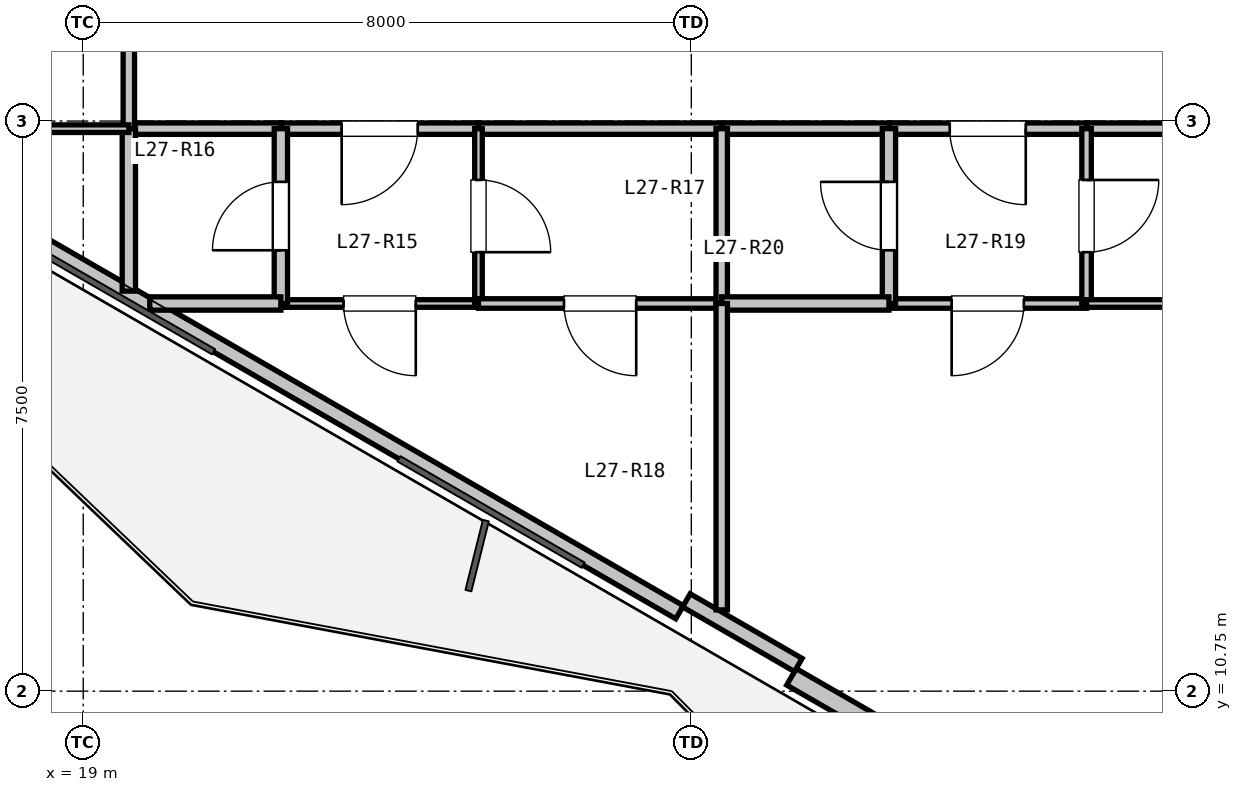
"""IFC4 building model, lengths in metres.
Left out: names, types, materials, properties, quantities, classifications, styles, units other than length and angle.
Written with IfcOpenShell. Run it as: python <this file> out.ifc"""

import sys

from ifc_helpers import new_model, si_unit, direction, frame, frame_2d, origin, place, context, subcontext, project, spatial, rectangle, extrude, element, fill, save


model = new_model("IFC4")
c1 = context("Model", 3, precision=1e-05, world=origin(), true_north=direction((0.0, 1.0)))
c2 = subcontext(c1, "Body", "Model", "MODEL_VIEW")
j1 = project(units=[si_unit("LENGTHUNIT", "METRE"), si_unit("PLANEANGLEUNIT", "RADIAN")], contexts=[c1])
p1 = place(None, origin())
s1 = spatial("IfcSite", under=j1, at=p1, CompositionType="ELEMENT")
p2 = place(p1, origin())
s2 = spatial("IfcBuilding", under=s1, at=p2, CompositionType="ELEMENT")
p3 = place(p2, frame((0.0, 0.0, 99.9)))
s3 = spatial("IfcBuildingStorey", under=s2, at=p3, CompositionType="ELEMENT", Elevation=99.9)
p4 = place(p3, frame((38.649, 4.973, 0.0), z_axis=(0.0, 0.0, 1.0), x_axis=(-0.866023023012, 0.500004123596, 0.0)))
e1 = element("IfcWall", 1, at=p4, inside=s3, PredefinedType="SOLIDWALL", context=c2, shape_type="SweptSolid", body=[
    extrude(rectangle(XDim=11.93, YDim=0.25, at=frame_2d((5.965, 0.0))), origin(), (0.0, 0.0, 1.0), 2.67),
])
p5 = place(p4, frame((7.616, 0.0, 0.0)))
e2 = element("IfcOpeningElement", 2, at=p5, cuts=e1, PredefinedType="OPENING", context=c2, shape_type="SweptSolid", body=[
    extrude(rectangle(XDim=1.1, YDim=2.1, at=frame_2d((0.55, 1.05))), frame((0.0, 0.135, 0.0), z_axis=(0.0, -1.0, 0.0), x_axis=(1.0, 0.0, 0.0)), (0.0, 0.0, 1.0), 0.27),
])
p6 = place(p3, frame((26.845, 11.788, 0.0), z_axis=(0.0, 0.0, 1.0), x_axis=(-0.866027010039, 0.499997217876, 0.0)))
e3 = element("IfcWall", 3, at=p6, inside=s3, PredefinedType="PARAPET", context=c2, shape_type="SweptSolid", body=[
    extrude(rectangle(XDim=11.229, YDim=0.2, at=frame_2d((5.615, 0.0))), origin(), (0.0, 0.0, 1.0), 0.2),
])
p7 = place(p3, frame((28.407, 11.094, 0.0), z_axis=(0.0, 0.0, 1.0), x_axis=(-0.86605165483, 0.499954529098, 0.0)))
e4 = element("IfcWall", 4, at=p7, inside=s3, PredefinedType="PARAPET", context=c2, shape_type="SweptSolid", body=[
    extrude(rectangle(XDim=1.7, YDim=0.2, at=frame_2d((0.85, 0.0))), origin(), (0.0, 0.0, 1.0), 2.67),
])
p8 = place(p3, frame((35.8, 18.15, 0.0), z_axis=(0.0, 0.0, 1.0), x_axis=(-1.0, 0.0, 0.0)))
e5 = element("IfcWall", 5, at=p8, inside=s3, PredefinedType="PARTITIONING", context=c2, shape_type="SweptSolid", body=[
    extrude(rectangle(XDim=3.6, YDim=0.15, at=frame_2d((1.8, 0.0))), origin(), (0.0, 0.0, 1.0), 3.05),
])
p9 = place(p3, frame((32.2, 18.15, 0.0), z_axis=(0.0, 0.0, 1.0), x_axis=(-1.0, 0.0, 0.0)))
e6 = element("IfcWall", 6, at=p9, inside=s3, PredefinedType="PARTITIONING", context=c2, shape_type="SweptSolid", body=[
    extrude(rectangle(XDim=2.6, YDim=0.15, at=frame_2d((1.3, 0.0))), origin(), (0.0, 0.0, 1.0), 3.05),
])
p10 = place(p9, frame((0.8, 0.0, 0.0)))
e7 = element("IfcOpeningElement", 7, at=p10, cuts=e6, PredefinedType="OPENING", context=c2, shape_type="SweptSolid", body=[
    extrude(rectangle(XDim=1.0, YDim=2.15, at=frame_2d((0.5, 1.075))), frame((0.0, 0.085, 0.0), z_axis=(0.0, -1.0, 0.0), x_axis=(1.0, 0.0, 0.0)), (0.0, 0.0, 1.0), 0.17),
])
p11 = place(p3, frame((29.6, 18.15, 0.0), z_axis=(0.0, 0.0, 1.0), x_axis=(-1.0, 0.0, 0.0)))
e8 = element("IfcWall", 8, at=p11, inside=s3, PredefinedType="PARTITIONING", context=c2, shape_type="SweptSolid", body=[
    extrude(rectangle(XDim=2.2, YDim=0.15, at=frame_2d((1.1, 0.0))), origin(), (0.0, 0.0, 1.0), 3.05),
])
p12 = place(p3, frame((27.4, 18.15, 0.0), z_axis=(0.0, 0.0, 1.0), x_axis=(-1.0, 0.0, 0.0)))
e9 = element("IfcWall", 9, at=p12, inside=s3, PredefinedType="PARTITIONING", context=c2, shape_type="SweptSolid", body=[
    extrude(rectangle(XDim=3.2, YDim=0.15, at=frame_2d((1.6, 0.0))), origin(), (0.0, 0.0, 1.0), 2.423),
])
p13 = place(p3, frame((24.2, 18.15, 0.0), z_axis=(0.0, 0.0, 1.0), x_axis=(-1.0, 0.0, 0.0)))
e10 = element("IfcWall", 10, at=p13, inside=s3, PredefinedType="PARTITIONING", context=c2, shape_type="SweptSolid", body=[
    extrude(rectangle(XDim=2.6, YDim=0.15, at=frame_2d((1.3, 0.0))), origin(), (0.0, 0.0, 1.0), 2.423),
])
p14 = place(p13, frame((0.8, 0.0, 0.0)))
e11 = element("IfcOpeningElement", 11, at=p14, cuts=e10, PredefinedType="OPENING", context=c2, shape_type="SweptSolid", body=[
    extrude(rectangle(XDim=1.0, YDim=2.15, at=frame_2d((0.5, 1.075))), frame((0.0, 0.085, 0.0), z_axis=(0.0, -1.0, 0.0), x_axis=(1.0, 0.0, 0.0)), (0.0, 0.0, 1.0), 0.17),
])
p15 = place(p3, frame((21.6, 18.15, 0.0), z_axis=(0.0, 0.0, 1.0), x_axis=(-1.0, 0.0, 0.0)))
e12 = element("IfcWall", 12, at=p15, inside=s3, PredefinedType="PARTITIONING", context=c2, shape_type="SweptSolid", body=[
    extrude(rectangle(XDim=2.0, YDim=0.15, at=frame_2d((1.0, 0.0))), origin(), (0.0, 0.0, 1.0), 3.05),
])
p16 = place(p3, frame((19.6, 18.15, 0.0), z_axis=(0.0, 0.0, 1.0), x_axis=(0.0, 1.0, 0.0)))
e13 = element("IfcWall", 13, at=p16, inside=s3, PredefinedType="PARTITIONING", context=c2, shape_type="SweptSolid", body=[
    extrude(rectangle(XDim=3.65, YDim=0.15, at=frame_2d((1.825, 0.0))), origin(), (0.0, 0.0, 1.0), 2.423),
])
p17 = place(p16, frame((1.325, 0.0, 0.0)))
e14 = element("IfcOpeningElement", 14, at=p17, cuts=e13, PredefinedType="OPENING", context=c2, shape_type="SweptSolid", body=[
    extrude(rectangle(XDim=1.0, YDim=2.15, at=frame_2d((0.5, 1.075))), frame((0.0, 0.085, 0.0), z_axis=(0.0, -1.0, 0.0), x_axis=(1.0, 0.0, 0.0)), (0.0, 0.0, 1.0), 0.17),
])
p18 = place(p3, frame((24.2, 15.85, 0.0), z_axis=(0.0, 0.0, 1.0), x_axis=(-1.0, 0.0, 0.0)))
e15 = element("IfcWall", 15, at=p18, inside=s3, PredefinedType="PARTITIONING", context=c2, shape_type="SweptSolid", body=[
    extrude(rectangle(XDim=2.6, YDim=0.1, at=frame_2d((1.3, 0.0))), origin(), (0.0, 0.0, 1.0), 3.05),
])
p19 = place(p18, frame((0.825, 0.0, 0.0)))
e16 = element("IfcOpeningElement", 16, at=p19, cuts=e15, PredefinedType="OPENING", context=c2, shape_type="SweptSolid", body=[
    extrude(rectangle(XDim=0.95, YDim=2.1, at=frame_2d((0.475, 1.05))), frame((0.0, 0.06, 0.0), z_axis=(0.0, -1.0, 0.0), x_axis=(1.0, 0.0, 0.0)), (0.0, 0.0, 1.0), 0.12),
])
p20 = place(p3, frame((21.6, 15.85, 0.0), z_axis=(0.0, 0.0, 1.0), x_axis=(0.0, 1.0, 0.0)))
e17 = element("IfcWall", 17, at=p20, inside=s3, PredefinedType="PLUMBINGWALL", context=c2, shape_type="SweptSolid", body=[
    extrude(rectangle(XDim=2.3, YDim=0.175, at=frame_2d((1.15, 0.0))), origin(), (0.0, 0.0, 1.0), 3.05),
])
p21 = place(p20, frame((0.7, 0.0, 0.0)))
e18 = element("IfcOpeningElement", 18, at=p21, cuts=e17, PredefinedType="OPENING", context=c2, shape_type="SweptSolid", body=[
    extrude(rectangle(XDim=0.9, YDim=2.1, at=frame_2d((0.45, 1.05))), frame((0.0, 0.097, 0.0), z_axis=(0.0, -1.0, 0.0), x_axis=(1.0, 0.0, 0.0)), (0.0, 0.0, 1.0), 0.195),
])
p22 = place(p3, frame((24.2, 18.15, 0.0), z_axis=(0.0, 0.0, 1.0), x_axis=(0.0, -1.0, 0.0)))
e19 = element("IfcWall", 19, at=p22, inside=s3, PredefinedType="PARTITIONING", context=c2, shape_type="SweptSolid", body=[
    extrude(rectangle(XDim=2.3, YDim=0.1, at=frame_2d((1.15, 0.0))), origin(), (0.0, 0.0, 1.0), 2.423),
])
p23 = place(p22, frame((0.675, 0.0, 0.0)))
e20 = element("IfcOpeningElement", 20, at=p23, cuts=e19, PredefinedType="OPENING", context=c2, shape_type="SweptSolid", body=[
    extrude(rectangle(XDim=0.95, YDim=2.1, at=frame_2d((0.475, 1.05))), frame((0.0, 0.06, 0.0), z_axis=(0.0, -1.0, 0.0), x_axis=(1.0, 0.0, 0.0)), (0.0, 0.0, 1.0), 0.12),
])
p24 = place(p3, frame((32.2, 15.85, 0.0), z_axis=(0.0, 0.0, 1.0), x_axis=(-1.0, 0.0, 0.0)))
e21 = element("IfcWall", 21, at=p24, inside=s3, PredefinedType="PARTITIONING", context=c2, shape_type="SweptSolid", body=[
    extrude(rectangle(XDim=2.6, YDim=0.125, at=frame_2d((1.3, 0.0))), origin(), (0.0, 0.0, 1.0), 3.05),
])
p25 = place(p24, frame((0.825, 0.0, 0.0)))
e22 = element("IfcOpeningElement", 22, at=p25, cuts=e21, PredefinedType="OPENING", context=c2, shape_type="SweptSolid", body=[
    extrude(rectangle(XDim=0.95, YDim=2.1, at=frame_2d((0.475, 1.05))), frame((0.0, 0.073, 0.0), z_axis=(0.0, -1.0, 0.0), x_axis=(1.0, 0.0, 0.0)), (0.0, 0.0, 1.0), 0.145),
])
p26 = place(p3, frame((29.6, 15.85, 0.0), z_axis=(0.0, 0.0, 1.0), x_axis=(0.0, 1.0, 0.0)))
e23 = element("IfcWall", 23, at=p26, inside=s3, PredefinedType="PLUMBINGWALL", context=c2, shape_type="SweptSolid", body=[
    extrude(rectangle(XDim=2.3, YDim=0.175, at=frame_2d((1.15, 0.0))), origin(), (0.0, 0.0, 1.0), 3.05),
])
p27 = place(p26, frame((0.7, 0.0, 0.0)))
e24 = element("IfcOpeningElement", 24, at=p27, cuts=e23, PredefinedType="OPENING", context=c2, shape_type="SweptSolid", body=[
    extrude(rectangle(XDim=0.9, YDim=2.1, at=frame_2d((0.45, 1.05))), frame((0.0, 0.097, 0.0), z_axis=(0.0, -1.0, 0.0), x_axis=(1.0, 0.0, 0.0)), (0.0, 0.0, 1.0), 0.195),
])
p28 = place(p3, frame((32.2, 18.15, 0.0), z_axis=(0.0, 0.0, 1.0), x_axis=(0.0, -1.0, 0.0)))
e25 = element("IfcWall", 25, at=p28, inside=s3, PredefinedType="PARTITIONING", context=c2, shape_type="SweptSolid", body=[
    extrude(rectangle(XDim=2.3, YDim=0.125, at=frame_2d((1.15, 0.0))), origin(), (0.0, 0.0, 1.0), 3.05),
])
p29 = place(p28, frame((0.675, 0.0, 0.0)))
e26 = element("IfcOpeningElement", 26, at=p29, cuts=e25, PredefinedType="OPENING", context=c2, shape_type="SweptSolid", body=[
    extrude(rectangle(XDim=0.95, YDim=2.1, at=frame_2d((0.475, 1.05))), frame((0.0, 0.073, 0.0), z_axis=(0.0, -1.0, 0.0), x_axis=(1.0, 0.0, 0.0)), (0.0, 0.0, 1.0), 0.145),
])
p30 = place(p3, frame((21.6, 15.85, 0.0), z_axis=(0.0, 0.0, 1.0), x_axis=(-1.0, 0.0, 0.0)))
e27 = element("IfcWall", 27, at=p30, inside=s3, PredefinedType="PLUMBINGWALL", context=c2, shape_type="SweptSolid", body=[
    extrude(rectangle(XDim=1.725, YDim=0.175, at=frame_2d((0.862, 0.0))), origin(), (0.0, 0.0, 1.0), 2.365),
])
p31 = place(p3, frame((19.6, 16.013, 0.0), z_axis=(0.0, 0.0, 1.0), x_axis=(0.0, 1.0, 0.0)))
e28 = element("IfcWall", 28, at=p31, inside=s3, PredefinedType="PLUMBINGWALL", context=c2, shape_type="SweptSolid", body=[
    extrude(rectangle(XDim=2.137, YDim=0.175, at=frame_2d((1.068, 0.0))), origin(), (0.0, 0.0, 1.0), 2.365),
])
p32 = place(p3, frame((27.4, 15.85, 0.0), z_axis=(0.0, 0.0, 1.0), x_axis=(-1.0, 0.0, 0.0)))
e29 = element("IfcWall", 29, at=p32, inside=s3, PredefinedType="PARTITIONING", context=c2, shape_type="SweptSolid", body=[
    extrude(rectangle(XDim=3.2, YDim=0.125, at=frame_2d((1.6, 0.0))), origin(), (0.0, 0.0, 1.0), 2.423),
])
p33 = place(p32, frame((1.125, 0.0, 0.0)))
e30 = element("IfcOpeningElement", 30, at=p33, cuts=e29, PredefinedType="OPENING", context=c2, shape_type="SweptSolid", body=[
    extrude(rectangle(XDim=0.95, YDim=2.1, at=frame_2d((0.475, 1.05))), frame((0.0, 0.073, 0.0), z_axis=(0.0, -1.0, 0.0), x_axis=(1.0, 0.0, 0.0)), (0.0, 0.0, 1.0), 0.145),
])
p34 = place(p3, frame((27.4, 18.15, 0.0), z_axis=(0.0, 0.0, 1.0), x_axis=(0.0, -1.0, 0.0)))
e31 = element("IfcWall", 31, at=p34, inside=s3, PredefinedType="PARTITIONING", context=c2, shape_type="SweptSolid", body=[
    extrude(rectangle(XDim=2.3, YDim=0.15, at=frame_2d((1.15, 0.0))), origin(), (0.0, 0.0, 1.0), 3.05),
])
p35 = place(p3, frame((29.6, 15.85, 0.0), z_axis=(0.0, 0.0, 1.0), x_axis=(-1.0, 0.0, 0.0)))
e32 = element("IfcWall", 32, at=p35, inside=s3, PredefinedType="PLUMBINGWALL", context=c2, shape_type="SweptSolid", body=[
    extrude(rectangle(XDim=2.2, YDim=0.175, at=frame_2d((1.1, 0.0))), origin(), (0.0, 0.0, 1.0), 3.05),
])
p36 = place(p3, frame((35.8, 15.85, 0.0), z_axis=(0.0, 0.0, 1.0), x_axis=(-1.0, 0.0, 0.0)))
e33 = element("IfcWall", 33, at=p36, inside=s3, PredefinedType="PARTITIONING", context=c2, shape_type="SweptSolid", body=[
    extrude(rectangle(XDim=3.6, YDim=0.1, at=frame_2d((1.8, 0.0))), origin(), (0.0, 0.0, 1.0), 3.05),
])
p37 = place(p36, frame((1.325, 0.0, 0.0)))
e34 = element("IfcOpeningElement", 34, at=p37, cuts=e33, PredefinedType="OPENING", context=c2, shape_type="SweptSolid", body=[
    extrude(rectangle(XDim=0.95, YDim=2.1, at=frame_2d((0.475, 1.05))), frame((0.0, 0.06, 0.0), z_axis=(0.0, -1.0, 0.0), x_axis=(1.0, 0.0, 0.0)), (0.0, 0.0, 1.0), 0.12),
])
p38 = place(p3, frame((19.6, 18.15, 0.0), z_axis=(0.0, 0.0, 1.0), x_axis=(-1.0, 0.0, 0.0)))
e35 = element("IfcWall", 35, at=p38, inside=s3, PredefinedType="PARTITIONING", context=c2, shape_type="SweptSolid", body=[
    extrude(rectangle(XDim=2.6, YDim=0.1, at=frame_2d((1.3, 0.0))), origin(), (0.0, 0.0, 1.0), 2.365),
])
p39 = place(p3, frame((27.4, 15.85, 0.0), z_axis=(0.0, 0.0, 1.0), x_axis=(0.0, -1.0, 0.0)))
e36 = element("IfcWall", 36, at=p39, inside=s3, PredefinedType="PARTITIONING", context=c2, shape_type="SweptSolid", body=[
    extrude(rectangle(XDim=4.031, YDim=0.15, at=frame_2d((2.016, 0.0))), origin(), (0.0, 0.0, 1.0), 2.365),
])
p40 = place(p14, origin())
e37 = element("IfcDoor", 37, at=p40, inside=s3, OperationType="SINGLE_SWING_RIGHT", PredefinedType="DOOR", context=c2, shape_type="SweptSolid", body=[
    extrude(rectangle(XDim=1.0, YDim=2.15, at=frame_2d((0.5, 1.075))), frame((0.0, 0.025, 0.0), z_axis=(0.0, -1.0, 0.0), x_axis=(1.0, 0.0, 0.0)), (0.0, 0.0, 1.0), 0.05),
])
fill(e11, e37)
p41 = place(p10, origin())
e38 = element("IfcDoor", 38, at=p41, inside=s3, OperationType="SINGLE_SWING_LEFT", PredefinedType="DOOR", context=c2, shape_type="SweptSolid", body=[
    extrude(rectangle(XDim=1.0, YDim=2.15, at=frame_2d((0.5, 1.075))), frame((0.0, 0.025, 0.0), z_axis=(0.0, -1.0, 0.0), x_axis=(1.0, 0.0, 0.0)), (0.0, 0.0, 1.0), 0.05),
])
fill(e7, e38)
p42 = place(p21, origin())
e39 = element("IfcDoor", 39, at=p42, inside=s3, OperationType="SINGLE_SWING_LEFT", PredefinedType="DOOR", context=c2, shape_type="SweptSolid", body=[
    extrude(rectangle(XDim=0.9, YDim=2.1, at=frame_2d((0.45, 1.05))), frame((0.0, 0.025, 0.0), z_axis=(0.0, -1.0, 0.0), x_axis=(1.0, 0.0, 0.0)), (0.0, 0.0, 1.0), 0.05),
])
fill(e18, e39)
p43 = place(p23, origin())
e40 = element("IfcDoor", 40, at=p43, inside=s3, OperationType="SINGLE_SWING_RIGHT", PredefinedType="DOOR", context=c2, shape_type="SweptSolid", body=[
    extrude(rectangle(XDim=0.95, YDim=2.1, at=frame_2d((0.475, 1.05))), frame((0.0, 0.025, 0.0), z_axis=(0.0, -1.0, 0.0), x_axis=(1.0, 0.0, 0.0)), (0.0, 0.0, 1.0), 0.05),
])
fill(e20, e40)
p44 = place(p19, origin())
e41 = element("IfcDoor", 41, at=p44, inside=s3, OperationType="SINGLE_SWING_LEFT", PredefinedType="DOOR", context=c2, shape_type="SweptSolid", body=[
    extrude(rectangle(XDim=0.95, YDim=2.1, at=frame_2d((0.475, 1.05))), frame((0.0, 0.025, 0.0), z_axis=(0.0, -1.0, 0.0), x_axis=(1.0, 0.0, 0.0)), (0.0, 0.0, 1.0), 0.05),
])
fill(e16, e41)
p45 = place(p27, origin())
e42 = element("IfcDoor", 42, at=p45, inside=s3, OperationType="SINGLE_SWING_RIGHT", PredefinedType="DOOR", context=c2, shape_type="SweptSolid", body=[
    extrude(rectangle(XDim=0.9, YDim=2.1, at=frame_2d((0.45, 1.05))), frame((0.0, 0.025, 0.0), z_axis=(0.0, -1.0, 0.0), x_axis=(1.0, 0.0, 0.0)), (0.0, 0.0, 1.0), 0.05),
])
fill(e24, e42)
p46 = place(p29, origin())
e43 = element("IfcDoor", 43, at=p46, inside=s3, OperationType="SINGLE_SWING_LEFT", PredefinedType="DOOR", context=c2, shape_type="SweptSolid", body=[
    extrude(rectangle(XDim=0.95, YDim=2.1, at=frame_2d((0.475, 1.05))), frame((0.0, 0.025, 0.0), z_axis=(0.0, -1.0, 0.0), x_axis=(1.0, 0.0, 0.0)), (0.0, 0.0, 1.0), 0.05),
])
fill(e26, e43)
p47 = place(p25, origin())
e44 = element("IfcDoor", 44, at=p47, inside=s3, OperationType="SINGLE_SWING_RIGHT", PredefinedType="DOOR", context=c2, shape_type="SweptSolid", body=[
    extrude(rectangle(XDim=0.95, YDim=2.1, at=frame_2d((0.475, 1.05))), frame((0.0, 0.025, 0.0), z_axis=(0.0, -1.0, 0.0), x_axis=(1.0, 0.0, 0.0)), (0.0, 0.0, 1.0), 0.05),
])
fill(e22, e44)
p48 = place(p33, origin())
e45 = element("IfcDoor", 45, at=p48, inside=s3, OperationType="SINGLE_SWING_LEFT", PredefinedType="DOOR", context=c2, shape_type="SweptSolid", body=[
    extrude(rectangle(XDim=0.95, YDim=2.1, at=frame_2d((0.475, 1.05))), frame((0.0, 0.025, 0.0), z_axis=(0.0, -1.0, 0.0), x_axis=(1.0, 0.0, 0.0)), (0.0, 0.0, 1.0), 0.05),
])
fill(e30, e45)
save(model, sys.argv[1])
